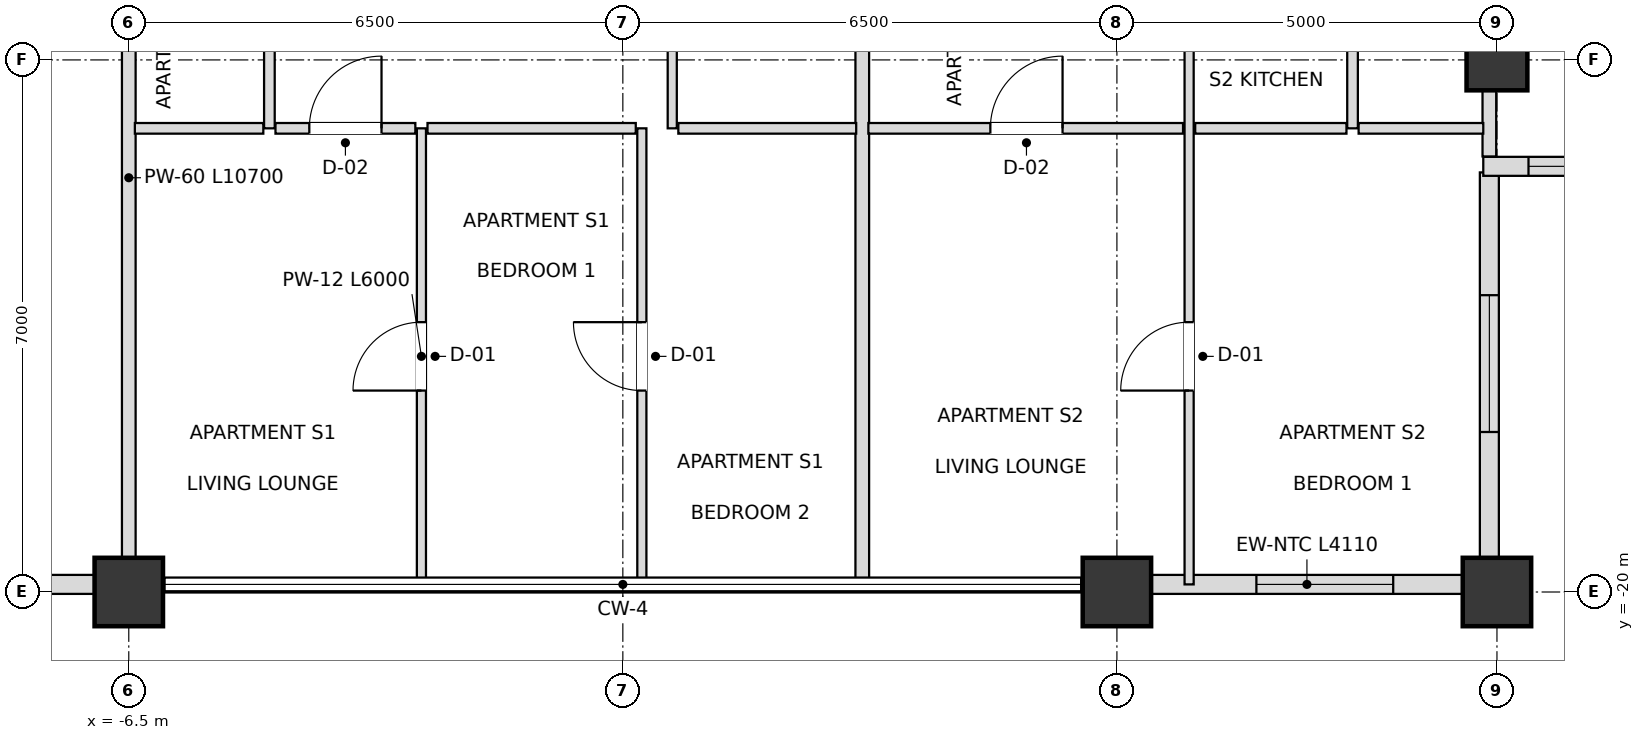
"""IFC4 building model, lengths in metres.
Left out: names, types, materials, properties, quantities, classifications, styles, units other than length and angle.
Written with IfcOpenShell. Run it as: python <this file> out.ifc"""

import sys

from ifc_helpers import new_model, si_unit, direction, frame, frame_2d, origin, origin_2d, place, context, subcontext, project, spatial, rectangle, extrude, element, fill, save


model = new_model("IFC4")
c1 = context("Model", 3, precision=1e-05, world=origin(), true_north=direction((0.0, 1.0)))
c2 = subcontext(c1, "Body", "Model", "MODEL_VIEW")
j1 = project(units=[si_unit("LENGTHUNIT", "METRE"), si_unit("PLANEANGLEUNIT", "RADIAN")], contexts=[c1])
p1 = place(None, origin())
s1 = spatial("IfcSite", under=j1, at=p1, CompositionType="ELEMENT")
p2 = place(p1, origin())
s2 = spatial("IfcBuilding", under=s1, at=p2, CompositionType="ELEMENT")
p3 = place(p2, frame((0.0, 0.0, 233.1)))
s3 = spatial("IfcBuildingStorey", under=s2, at=p3, CompositionType="ELEMENT", Elevation=233.1)
for number, where, z_axis, x_axis in (
    (1, (-6.5, -20.0, 0.0), (0.0, 0.0, 1.0), (1.0, 0.0, 0.0)),
    (2, (6.5, -20.0, 0.0), (0.0, 0.0, 1.0), (1.0, 0.0, 0.0)),
    (3, (11.5, -20.0, 0.0), (0.0, 0.0, 1.0), (1.0, 0.0, 0.0)),
):
    element("IfcColumn", number, at=place(p3, frame(where, z_axis=z_axis, x_axis=x_axis)), inside=s3, PredefinedType="USERDEFINED", context=c2, shape_type="SweptSolid", body=[
        extrude(rectangle(XDim=0.9, YDim=0.9, at=origin_2d()), origin(), (0.0, 0.0, 1.0), 3.6),
    ])
p4 = place(p3, frame((11.5, -13.0, 0.0), z_axis=(0.0, 0.0, 1.0), x_axis=(1.0, 0.0, 0.0)))
e4 = element("IfcColumn", 4, at=p4, inside=s3, PredefinedType="COLUMN", context=c2, shape_type="SweptSolid", body=[
    extrude(rectangle(XDim=0.8, YDim=0.8, at=origin_2d()), origin(), (0.0, 0.0, 1.0), 3.6),
])
p5 = place(p3, frame((-11.055, -19.9, 0.0), z_axis=(0.0, 0.0, 1.0), x_axis=(1.0, 0.0, 0.0)))
e5 = element("IfcWall", 5, at=p5, inside=s3, PredefinedType="SOLIDWALL", context=c2, shape_type="SweptSolid", body=[
    extrude(rectangle(XDim=4.11, YDim=0.25, at=frame_2d((2.055, 0.0))), origin(), (0.0, 0.0, 1.0), 2.748),
])
p6 = place(p5, frame((1.155, 0.0, 0.72)))
e6 = element("IfcOpeningElement", 6, at=p6, cuts=e5, PredefinedType="OPENING", context=c2, shape_type="SweptSolid", body=[
    extrude(rectangle(XDim=1.8, YDim=1.68, at=frame_2d((0.9, 0.84))), frame((0.0, 0.135, 0.0), z_axis=(0.0, -1.0, 0.0), x_axis=(1.0, 0.0, 0.0)), (0.0, 0.0, 1.0), 0.27),
])
p7 = place(p3, frame((6.945, -19.9, 0.0), z_axis=(0.0, 0.0, 1.0), x_axis=(1.0, 0.0, 0.0)))
e7 = element("IfcWall", 7, at=p7, inside=s3, PredefinedType="SOLIDWALL", context=c2, shape_type="SweptSolid", body=[
    extrude(rectangle(XDim=4.11, YDim=0.25, at=frame_2d((2.055, 0.0))), origin(), (0.0, 0.0, 1.0), 2.748),
])
p8 = place(p7, frame((1.39, 0.0, 0.72)))
e8 = element("IfcOpeningElement", 8, at=p8, cuts=e7, PredefinedType="OPENING", context=c2, shape_type="SweptSolid", body=[
    extrude(rectangle(XDim=1.8, YDim=1.68, at=frame_2d((0.9, 0.84))), frame((0.0, 0.135, 0.0), z_axis=(0.0, -1.0, 0.0), x_axis=(1.0, 0.0, 0.0)), (0.0, 0.0, 1.0), 0.27),
])
p9 = place(p3, frame((11.4, -19.82, 0.0), z_axis=(0.0, 0.0, 1.0), x_axis=(0.0, 1.0, 0.0)))
e9 = element("IfcWall", 9, at=p9, inside=s3, PredefinedType="SOLIDWALL", context=c2, shape_type="SweptSolid", body=[
    extrude(rectangle(XDim=5.34, YDim=0.25, at=frame_2d((2.67, 0.0))), origin(), (0.0, 0.0, 1.0), 2.748),
])
p10 = place(p9, frame((1.925, 0.0, 0.72)))
e10 = element("IfcOpeningElement", 10, at=p10, cuts=e9, PredefinedType="OPENING", context=c2, shape_type="SweptSolid", body=[
    extrude(rectangle(XDim=1.8, YDim=1.68, at=frame_2d((0.9, 0.84))), frame((0.0, 0.135, 0.0), z_axis=(0.0, -1.0, 0.0), x_axis=(1.0, 0.0, 0.0)), (0.0, 0.0, 1.0), 0.27),
])
p11 = place(p3, frame((11.32, -14.4, 0.0), z_axis=(0.0, 0.0, 1.0), x_axis=(1.0, 0.0, 0.0)))
e11 = element("IfcWall", 11, at=p11, inside=s3, PredefinedType="SOLIDWALL", context=c2, shape_type="SweptSolid", body=[
    extrude(rectangle(XDim=5.66, YDim=0.25, at=frame_2d((2.83, 0.0))), origin(), (0.0, 0.0, 1.0), 2.748),
])
p12 = place(p11, frame((0.595, 0.0, 0.72)))
e12 = element("IfcOpeningElement", 12, at=p12, cuts=e11, PredefinedType="OPENING", context=c2, shape_type="SweptSolid", body=[
    extrude(rectangle(XDim=1.8, YDim=1.68, at=frame_2d((0.9, 0.84))), frame((0.0, 0.135, 0.0), z_axis=(0.0, -1.0, 0.0), x_axis=(1.0, 0.0, 0.0)), (0.0, 0.0, 1.0), 0.27),
])
p13 = place(p11, frame((3.265, 0.0, 0.72)))
e13 = element("IfcOpeningElement", 13, at=p13, cuts=e11, PredefinedType="OPENING", context=c2, shape_type="SweptSolid", body=[
    extrude(rectangle(XDim=1.8, YDim=1.68, at=frame_2d((0.9, 0.84))), frame((0.0, 0.135, 0.0), z_axis=(0.0, -1.0, 0.0), x_axis=(1.0, 0.0, 0.0)), (0.0, 0.0, 1.0), 0.27),
])
p14 = place(p3, frame((-6.5, -19.9, 0.0), z_axis=(0.0, 0.0, 1.0), x_axis=(0.0, 1.0, 0.0)))
e14 = element("IfcWall", 14, at=p14, inside=s3, PredefinedType="PARTITIONING", context=c2, shape_type="SweptSolid", body=[
    extrude(rectangle(XDim=10.7, YDim=0.18, at=frame_2d((5.35, 0.0))), origin(), (0.0, 0.0, 1.0), 2.826),
])
p15 = place(p3, frame((-4.65, -13.9, 0.0), z_axis=(0.0, 0.0, 1.0), x_axis=(0.0, 1.0, 0.0)))
e15 = element("IfcWall", 15, at=p15, inside=s3, PredefinedType="PARTITIONING", context=c2, shape_type="SweptSolid", body=[
    extrude(rectangle(XDim=4.7, YDim=0.14, at=frame_2d((2.35, 0.0))), origin(), (0.0, 0.0, 1.0), 3.38),
])
p16 = place(p15, frame((1.9, 0.0, 0.0)))
e16 = element("IfcOpeningElement", 16, at=p16, cuts=e15, PredefinedType="OPENING", context=c2, shape_type="SweptSolid", body=[
    extrude(rectangle(XDim=0.9, YDim=2.1, at=frame_2d((0.45, 1.05))), frame((0.0, 0.08, 0.0), z_axis=(0.0, -1.0, 0.0), x_axis=(1.0, 0.0, 0.0)), (0.0, 0.0, 1.0), 0.16),
])
p17 = place(p3, frame((-2.65, -19.9, 0.0), z_axis=(0.0, 0.0, 1.0), x_axis=(0.0, 1.0, 0.0)))
e17 = element("IfcWall", 17, at=p17, inside=s3, PredefinedType="PARTITIONING", context=c2, shape_type="SweptSolid", body=[
    extrude(rectangle(XDim=6.0, YDim=0.12, at=frame_2d((3.0, 0.0))), origin(), (0.0, 0.0, 1.0), 3.018),
])
p18 = place(p17, frame((2.55, 0.0, 0.0)))
e18 = element("IfcOpeningElement", 18, at=p18, cuts=e17, PredefinedType="OPENING", context=c2, shape_type="SweptSolid", body=[
    extrude(rectangle(XDim=0.9, YDim=2.1, at=frame_2d((0.45, 1.05))), frame((0.0, 0.07, 0.0), z_axis=(0.0, -1.0, 0.0), x_axis=(1.0, 0.0, 0.0)), (0.0, 0.0, 1.0), 0.14),
])
p19 = place(p3, frame((0.25, -19.9, 0.0), z_axis=(0.0, 0.0, 1.0), x_axis=(0.0, 1.0, 0.0)))
e19 = element("IfcWall", 19, at=p19, inside=s3, PredefinedType="PARTITIONING", context=c2, shape_type="SweptSolid", body=[
    extrude(rectangle(XDim=6.0, YDim=0.12, at=frame_2d((3.0, 0.0))), origin(), (0.0, 0.0, 1.0), 3.018),
])
p20 = place(p19, frame((2.55, 0.0, 0.0)))
e20 = element("IfcOpeningElement", 20, at=p20, cuts=e19, PredefinedType="OPENING", context=c2, shape_type="SweptSolid", body=[
    extrude(rectangle(XDim=0.9, YDim=2.1, at=frame_2d((0.45, 1.05))), frame((0.0, 0.07, 0.0), z_axis=(0.0, -1.0, 0.0), x_axis=(1.0, 0.0, 0.0)), (0.0, 0.0, 1.0), 0.14),
])
p21 = place(p3, frame((0.65, -13.9, 0.0), z_axis=(0.0, 0.0, 1.0), x_axis=(0.0, 1.0, 0.0)))
e21 = element("IfcWall", 21, at=p21, inside=s3, PredefinedType="PARTITIONING", context=c2, shape_type="SweptSolid", body=[
    extrude(rectangle(XDim=4.7, YDim=0.12, at=frame_2d((2.35, 0.0))), origin(), (0.0, 0.0, 1.0), 3.38),
])
p22 = place(p21, frame((1.875, 0.0, 0.0)))
e22 = element("IfcOpeningElement", 22, at=p22, cuts=e21, PredefinedType="OPENING", context=c2, shape_type="SweptSolid", body=[
    extrude(rectangle(XDim=0.95, YDim=2.1, at=frame_2d((0.475, 1.05))), frame((0.0, 0.07, 0.0), z_axis=(0.0, -1.0, 0.0), x_axis=(1.0, 0.0, 0.0)), (0.0, 0.0, 1.0), 0.14),
])
p23 = place(p3, frame((3.15, -19.9, 0.0), z_axis=(0.0, 0.0, 1.0), x_axis=(0.0, 1.0, 0.0)))
e23 = element("IfcWall", 23, at=p23, inside=s3, PredefinedType="PARTITIONING", context=c2, shape_type="SweptSolid", body=[
    extrude(rectangle(XDim=10.7, YDim=0.18, at=frame_2d((5.35, 0.0))), origin(), (0.0, 0.0, 1.0), 3.018),
])
p24 = place(p3, frame((7.45, -19.9, 0.0), z_axis=(0.0, 0.0, 1.0), x_axis=(0.0, 1.0, 0.0)))
e24 = element("IfcWall", 24, at=p24, inside=s3, PredefinedType="PARTITIONING", context=c2, shape_type="SweptSolid", body=[
    extrude(rectangle(XDim=10.7, YDim=0.12, at=frame_2d((5.35, 0.0))), origin(), (0.0, 0.0, 1.0), 2.826),
])
p25 = place(p24, frame((7.875, 0.0, 0.0)))
e25 = element("IfcOpeningElement", 25, at=p25, cuts=e24, PredefinedType="OPENING", context=c2, shape_type="SweptSolid", body=[
    extrude(rectangle(XDim=0.95, YDim=2.1, at=frame_2d((0.475, 1.05))), frame((0.0, 0.07, 0.0), z_axis=(0.0, -1.0, 0.0), x_axis=(1.0, 0.0, 0.0)), (0.0, 0.0, 1.0), 0.14),
])
p26 = place(p24, frame((2.55, 0.0, 0.0)))
e26 = element("IfcOpeningElement", 26, at=p26, cuts=e24, PredefinedType="OPENING", context=c2, shape_type="SweptSolid", body=[
    extrude(rectangle(XDim=0.9, YDim=2.1, at=frame_2d((0.45, 1.05))), frame((0.0, 0.07, 0.0), z_axis=(0.0, -1.0, 0.0), x_axis=(1.0, 0.0, 0.0)), (0.0, 0.0, 1.0), 0.14),
])
p27 = place(p3, frame((9.6, -13.9, 0.0), z_axis=(0.0, 0.0, 1.0), x_axis=(0.0, 1.0, 0.0)))
e27 = element("IfcWall", 27, at=p27, inside=s3, PredefinedType="PARTITIONING", context=c2, shape_type="SweptSolid", body=[
    extrude(rectangle(XDim=4.7, YDim=0.14, at=frame_2d((2.35, 0.0))), origin(), (0.0, 0.0, 1.0), 2.826),
])
p28 = place(p27, frame((1.9, 0.0, 0.0)))
e28 = element("IfcOpeningElement", 28, at=p28, cuts=e27, PredefinedType="OPENING", context=c2, shape_type="SweptSolid", body=[
    extrude(rectangle(XDim=0.9, YDim=2.1, at=frame_2d((0.45, 1.05))), frame((0.0, 0.08, 0.0), z_axis=(0.0, -1.0, 0.0), x_axis=(1.0, 0.0, 0.0)), (0.0, 0.0, 1.0), 0.16),
])
p29 = place(p3, frame((11.4, -14.27, 0.0), z_axis=(0.0, 0.0, 1.0), x_axis=(0.0, 1.0, 0.0)))
e29 = element("IfcWall", 29, at=p29, inside=s3, PredefinedType="PARTITIONING", context=c2, shape_type="SweptSolid", body=[
    extrude(rectangle(XDim=5.07, YDim=0.18, at=frame_2d((2.535, 0.0))), origin(), (0.0, 0.0, 1.0), 2.748),
])
p30 = place(p3, frame((-6.42, -13.9, 0.0), z_axis=(0.0, 0.0, 1.0), x_axis=(1.0, 0.0, 0.0)))
e30 = element("IfcWall", 30, at=p30, inside=s3, PredefinedType="PARTITIONING", context=c2, shape_type="SweptSolid", body=[
    extrude(rectangle(XDim=1.69, YDim=0.14, at=frame_2d((0.845, 0.0))), origin(), (0.0, 0.0, 1.0), 3.38),
])
p31 = place(p3, frame((-4.57, -13.9, 0.0), z_axis=(0.0, 0.0, 1.0), x_axis=(1.0, 0.0, 0.0)))
e31 = element("IfcWall", 31, at=p31, inside=s3, PredefinedType="PARTITIONING", context=c2, shape_type="SweptSolid", body=[
    extrude(rectangle(XDim=1.84, YDim=0.14, at=frame_2d((0.92, 0.0))), origin(), (0.0, 0.0, 1.0), 3.38),
])
p32 = place(p31, frame((0.445, 0.0, 0.0)))
e32 = element("IfcOpeningElement", 32, at=p32, cuts=e31, PredefinedType="OPENING", context=c2, shape_type="SweptSolid", body=[
    extrude(rectangle(XDim=0.95, YDim=2.1, at=frame_2d((0.475, 1.05))), frame((0.0, 0.08, 0.0), z_axis=(0.0, -1.0, 0.0), x_axis=(1.0, 0.0, 0.0)), (0.0, 0.0, 1.0), 0.16),
])
p33 = place(p3, frame((-2.57, -13.9, 0.0), z_axis=(0.0, 0.0, 1.0), x_axis=(1.0, 0.0, 0.0)))
e33 = element("IfcWall", 33, at=p33, inside=s3, PredefinedType="PARTITIONING", context=c2, shape_type="SweptSolid", body=[
    extrude(rectangle(XDim=2.74, YDim=0.14, at=frame_2d((1.37, 0.0))), origin(), (0.0, 0.0, 1.0), 3.38),
])
p34 = place(p3, frame((0.73, -13.9, 0.0), z_axis=(0.0, 0.0, 1.0), x_axis=(1.0, 0.0, 0.0)))
e34 = element("IfcWall", 34, at=p34, inside=s3, PredefinedType="PARTITIONING", context=c2, shape_type="SweptSolid", body=[
    extrude(rectangle(XDim=2.34, YDim=0.14, at=frame_2d((1.17, 0.0))), origin(), (0.0, 0.0, 1.0), 3.38),
])
p35 = place(p3, frame((3.23, -13.9, 0.0), z_axis=(0.0, 0.0, 1.0), x_axis=(1.0, 0.0, 0.0)))
e35 = element("IfcWall", 35, at=p35, inside=s3, PredefinedType="PARTITIONING", context=c2, shape_type="SweptSolid", body=[
    extrude(rectangle(XDim=4.14, YDim=0.14, at=frame_2d((2.07, 0.0))), origin(), (0.0, 0.0, 1.0), 2.826),
])
p36 = place(p35, frame((1.605, 0.0, 0.0)))
e36 = element("IfcOpeningElement", 36, at=p36, cuts=e35, PredefinedType="OPENING", context=c2, shape_type="SweptSolid", body=[
    extrude(rectangle(XDim=0.95, YDim=2.1, at=frame_2d((0.475, 1.05))), frame((0.0, 0.08, 0.0), z_axis=(0.0, -1.0, 0.0), x_axis=(1.0, 0.0, 0.0)), (0.0, 0.0, 1.0), 0.16),
])
p37 = place(p3, frame((7.53, -13.9, 0.0), z_axis=(0.0, 0.0, 1.0), x_axis=(1.0, 0.0, 0.0)))
e37 = element("IfcWall", 37, at=p37, inside=s3, PredefinedType="PARTITIONING", context=c2, shape_type="SweptSolid", body=[
    extrude(rectangle(XDim=1.99, YDim=0.14, at=frame_2d((0.995, 0.0))), origin(), (0.0, 0.0, 1.0), 3.38),
])
p38 = place(p3, frame((9.68, -13.9, 0.0), z_axis=(0.0, 0.0, 1.0), x_axis=(1.0, 0.0, 0.0)))
e38 = element("IfcWall", 38, at=p38, inside=s3, PredefinedType="PARTITIONING", context=c2, shape_type="SweptSolid", body=[
    extrude(rectangle(XDim=1.64, YDim=0.14, at=frame_2d((0.82, 0.0))), origin(), (0.0, 0.0, 1.0), 3.38),
])
p39 = place(p8, origin())
e39 = element("IfcWindow", 39, at=p39, inside=s3, PartitioningType="SINGLE_PANEL", PredefinedType="WINDOW", context=c2, shape_type="SweptSolid", body=[
    extrude(rectangle(XDim=1.8, YDim=1.68, at=frame_2d((0.9, 0.84))), frame((0.0, 0.03, 0.0), z_axis=(0.0, -1.0, 0.0), x_axis=(1.0, 0.0, 0.0)), (0.0, 0.0, 1.0), 0.06),
])
fill(e8, e39)
p40 = place(p10, origin())
e40 = element("IfcWindow", 40, at=p40, inside=s3, PartitioningType="SINGLE_PANEL", PredefinedType="WINDOW", context=c2, shape_type="SweptSolid", body=[
    extrude(rectangle(XDim=1.8, YDim=1.68, at=frame_2d((0.9, 0.84))), frame((0.0, 0.03, 0.0), z_axis=(0.0, -1.0, 0.0), x_axis=(1.0, 0.0, 0.0)), (0.0, 0.0, 1.0), 0.06),
])
fill(e10, e40)
p41 = place(p12, origin())
e41 = element("IfcWindow", 41, at=p41, inside=s3, PartitioningType="SINGLE_PANEL", PredefinedType="WINDOW", context=c2, shape_type="SweptSolid", body=[
    extrude(rectangle(XDim=1.8, YDim=1.68, at=frame_2d((0.9, 0.84))), frame((0.0, 0.03, 0.0), z_axis=(0.0, -1.0, 0.0), x_axis=(1.0, 0.0, 0.0)), (0.0, 0.0, 1.0), 0.06),
])
fill(e12, e41)
p42 = place(p32, origin())
e42 = element("IfcDoor", 42, at=p42, inside=s3, OperationType="SINGLE_SWING_RIGHT", PredefinedType="DOOR", context=c2, shape_type="SweptSolid", body=[
    extrude(rectangle(XDim=0.95, YDim=2.1, at=frame_2d((0.475, 1.05))), frame((0.0, 0.025, 0.0), z_axis=(0.0, -1.0, 0.0), x_axis=(1.0, 0.0, 0.0)), (0.0, 0.0, 1.0), 0.05),
])
fill(e32, e42)
p43 = place(p18, origin())
e43 = element("IfcDoor", 43, at=p43, inside=s3, OperationType="SINGLE_SWING_LEFT", PredefinedType="DOOR", context=c2, shape_type="SweptSolid", body=[
    extrude(rectangle(XDim=0.9, YDim=2.1, at=frame_2d((0.45, 1.05))), frame((0.0, 0.025, 0.0), z_axis=(0.0, -1.0, 0.0), x_axis=(1.0, 0.0, 0.0)), (0.0, 0.0, 1.0), 0.05),
])
fill(e18, e43)
p44 = place(p20, origin())
e44 = element("IfcDoor", 44, at=p44, inside=s3, OperationType="SINGLE_SWING_RIGHT", PredefinedType="DOOR", context=c2, shape_type="SweptSolid", body=[
    extrude(rectangle(XDim=0.9, YDim=2.1, at=frame_2d((0.45, 1.05))), frame((0.0, 0.025, 0.0), z_axis=(0.0, -1.0, 0.0), x_axis=(1.0, 0.0, 0.0)), (0.0, 0.0, 1.0), 0.05),
])
fill(e20, e44)
p45 = place(p36, origin())
e45 = element("IfcDoor", 45, at=p45, inside=s3, OperationType="SINGLE_SWING_RIGHT", PredefinedType="DOOR", context=c2, shape_type="SweptSolid", body=[
    extrude(rectangle(XDim=0.95, YDim=2.1, at=frame_2d((0.475, 1.05))), frame((0.0, 0.025, 0.0), z_axis=(0.0, -1.0, 0.0), x_axis=(1.0, 0.0, 0.0)), (0.0, 0.0, 1.0), 0.05),
])
fill(e36, e45)
p46 = place(p26, origin())
e46 = element("IfcDoor", 46, at=p46, inside=s3, OperationType="SINGLE_SWING_LEFT", PredefinedType="DOOR", context=c2, shape_type="SweptSolid", body=[
    extrude(rectangle(XDim=0.9, YDim=2.1, at=frame_2d((0.45, 1.05))), frame((0.0, 0.025, 0.0), z_axis=(0.0, -1.0, 0.0), x_axis=(1.0, 0.0, 0.0)), (0.0, 0.0, 1.0), 0.05),
])
fill(e26, e46)
save(model, sys.argv[1])
